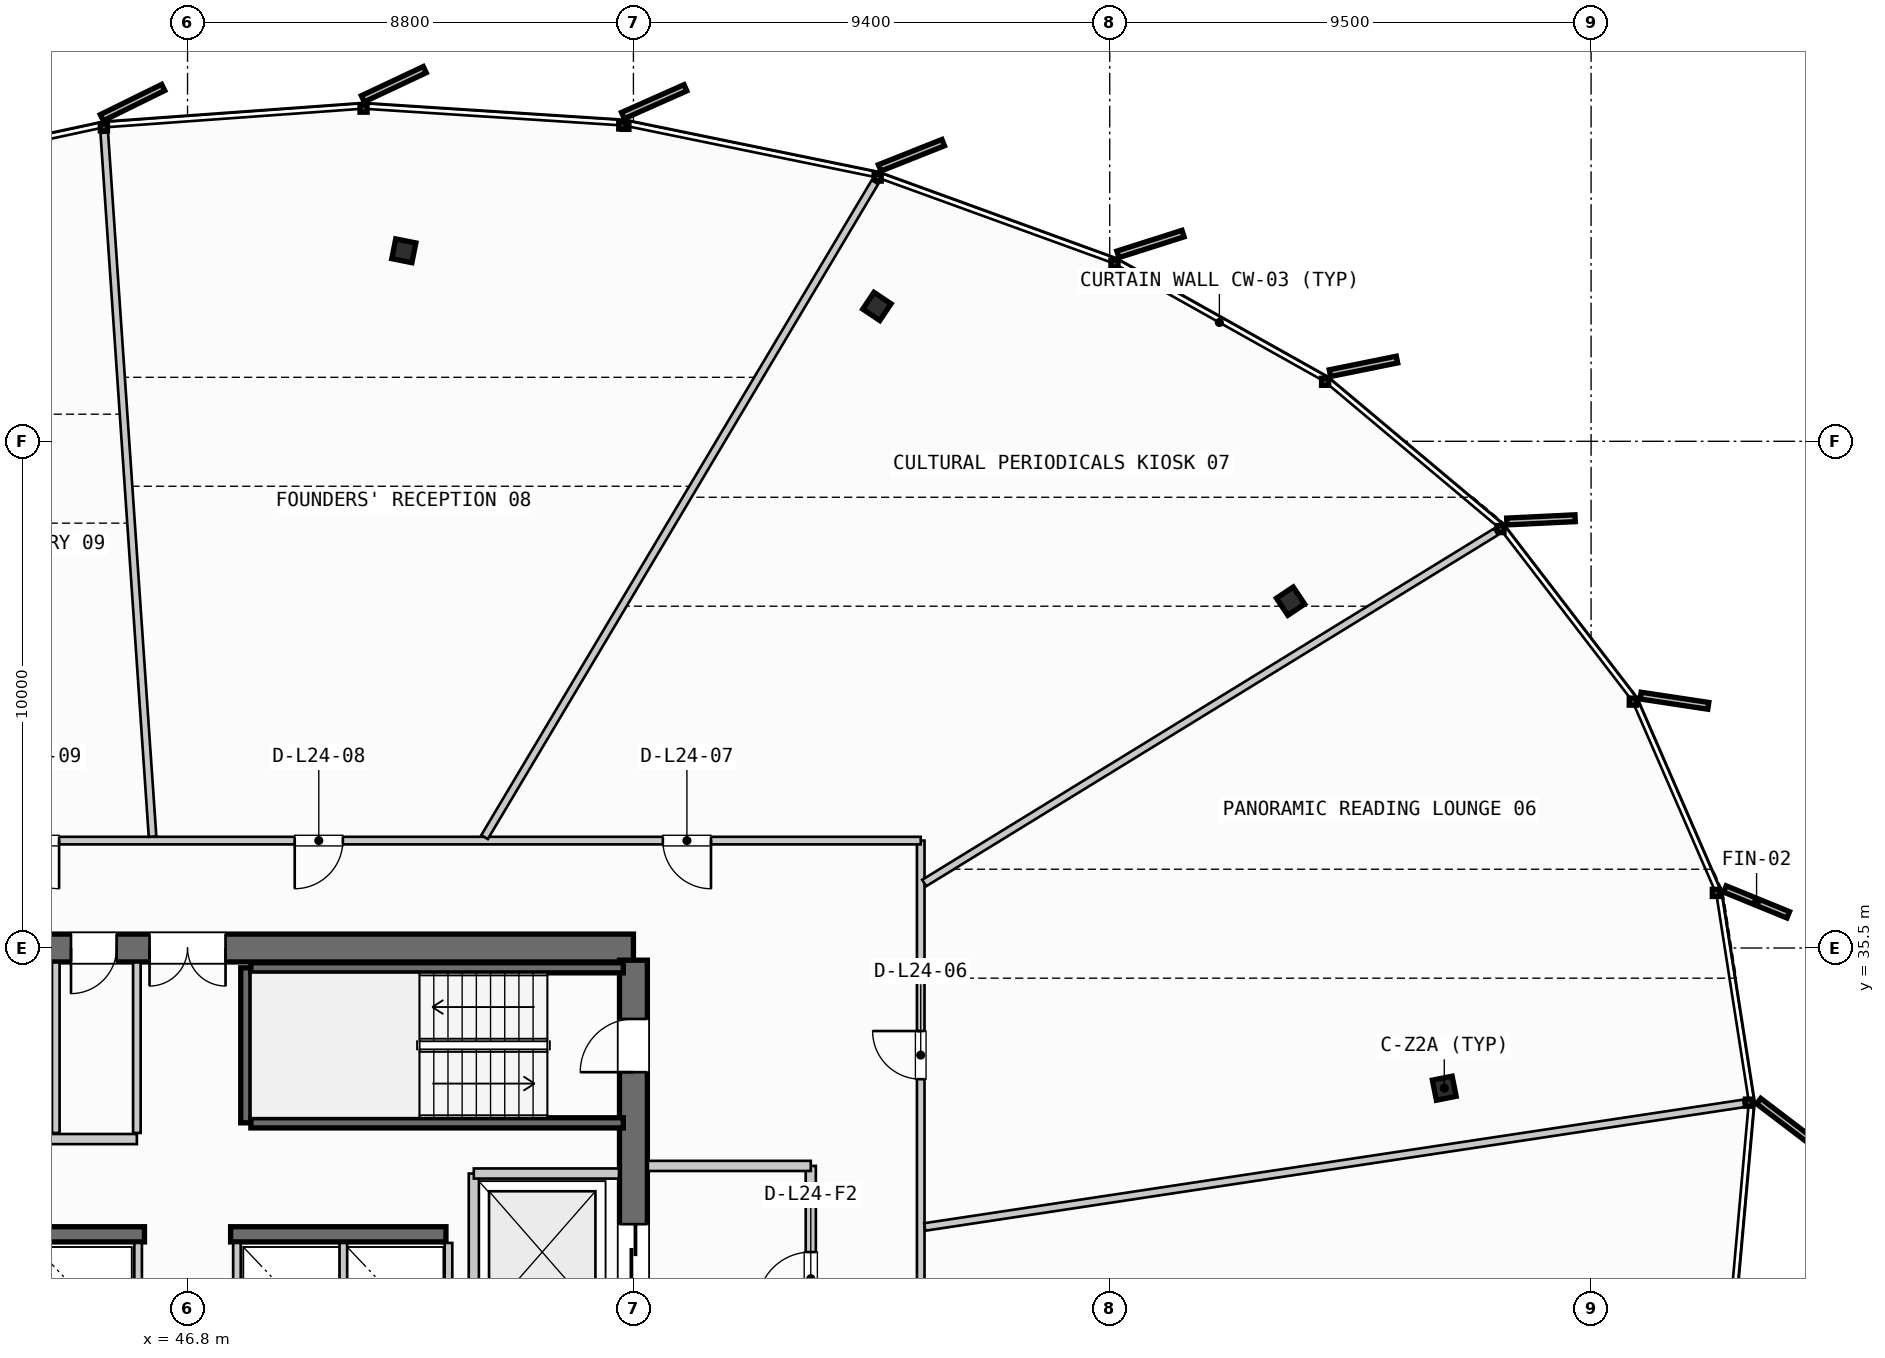
"""IFC4 building model, lengths in metres.
Left out: names, types, materials, properties, quantities, classifications, styles, units other than length and angle.
Written with IfcOpenShell. Run it as: python <this file> out.ifc"""

import sys

from ifc_helpers import new_model, si_unit, direction, frame, frame_2d, origin, origin_2d, place, context, subcontext, project, spatial, rectangle, i_section, extrude, source, transform, mapped, element, fill, save


model = new_model("IFC4")
c1 = context("Model", 3, precision=1e-05, world=origin(), true_north=direction((0.0, 1.0)))
c2 = subcontext(c1, "Body", "Model", "MODEL_VIEW")
j1 = project(units=[si_unit("LENGTHUNIT", "METRE"), si_unit("PLANEANGLEUNIT", "RADIAN")], contexts=[c1])
p1 = place(None, origin())
s1 = spatial("IfcSite", under=j1, at=p1, CompositionType="ELEMENT")
p2 = place(p1, origin())
s2 = spatial("IfcBuilding", under=s1, at=p2, CompositionType="ELEMENT")
p3 = place(p2, frame((0.0, 0.0, 100.0)))
s3 = spatial("IfcBuildingStorey", under=s2, at=p3, CompositionType="ELEMENT", Elevation=100.0)
p4 = place(p3, frame((55.6, 35.5, 0.0), z_axis=(0.0, 0.0, 1.0), x_axis=(-1.0, 0.0, 0.0)))
e1 = element("IfcWall", 1, at=p4, inside=s3, PredefinedType="SHEAR", context=c2, shape_type="SweptSolid", body=[
    extrude(rectangle(XDim=17.6, YDim=0.55, at=frame_2d((8.8, 0.0))), origin(), (0.0, 0.0, 1.0), 3.35),
])
p5 = place(p4, frame((8.05, 0.0, 0.0)))
e2 = element("IfcOpeningElement", 2, at=p5, cuts=e1, PredefinedType="OPENING", context=c2, shape_type="SweptSolid", body=[
    extrude(rectangle(XDim=1.5, YDim=2.2, at=frame_2d((0.75, 1.1))), frame((0.0, 0.285, 0.0), z_axis=(0.0, -1.0, 0.0), x_axis=(1.0, 0.0, 0.0)), (0.0, 0.0, 1.0), 0.57),
])
p6 = place(p4, frame((14.95, 0.0, 0.0)))
e3 = element("IfcOpeningElement", 3, at=p6, cuts=e1, PredefinedType="OPENING", context=c2, shape_type="SweptSolid", body=[
    extrude(rectangle(XDim=1.4, YDim=2.3, at=frame_2d((0.7, 1.15))), frame((0.0, 0.285, 0.0), z_axis=(0.0, -1.0, 0.0), x_axis=(1.0, 0.0, 0.0)), (0.0, 0.0, 1.0), 0.57),
])
p7 = place(p4, frame((12.3, 0.0, 0.0)))
e4 = element("IfcOpeningElement", 4, at=p7, cuts=e1, PredefinedType="OPENING", context=c2, shape_type="SweptSolid", body=[
    extrude(rectangle(XDim=0.95, YDim=2.15, at=frame_2d((0.475, 1.075))), frame((0.0, 0.285, 0.0), z_axis=(0.0, -1.0, 0.0), x_axis=(1.0, 0.0, 0.0)), (0.0, 0.0, 1.0), 0.57),
])
p8 = place(p4, frame((10.2, 0.0, 0.0)))
e5 = element("IfcOpeningElement", 5, at=p8, cuts=e1, PredefinedType="OPENING", context=c2, shape_type="SweptSolid", body=[
    extrude(rectangle(XDim=0.9, YDim=2.15, at=frame_2d((0.45, 1.075))), frame((0.0, 0.285, 0.0), z_axis=(0.0, -1.0, 0.0), x_axis=(1.0, 0.0, 0.0)), (0.0, 0.0, 1.0), 0.57),
])
p9 = place(p3, frame((55.6, 20.34, 0.0), z_axis=(0.0, 0.0, 1.0), x_axis=(0.0, 1.0, 0.0)))
e6 = element("IfcWall", 6, at=p9, inside=s3, PredefinedType="SHEAR", context=c2, shape_type="SweptSolid", body=[
    extrude(rectangle(XDim=14.92, YDim=0.55, at=frame_2d((7.46, 0.0))), origin(), (0.0, 0.0, 1.0), 3.35),
])
p10 = place(p9, frame((12.71, 0.0, 0.0)))
e7 = element("IfcOpeningElement", 7, at=p10, cuts=e6, PredefinedType="OPENING", context=c2, shape_type="SweptSolid", body=[
    extrude(rectangle(XDim=1.05, YDim=2.15, at=frame_2d((0.525, 1.075))), frame((0.0, 0.285, 0.0), z_axis=(0.0, -1.0, 0.0), x_axis=(1.0, 0.0, 0.0)), (0.0, 0.0, 1.0), 0.57),
])
p11 = place(p9, frame((8.61, 0.0, 0.0)))
e8 = element("IfcOpeningElement", 8, at=p11, cuts=e6, PredefinedType="OPENING", context=c2, shape_type="SweptSolid", body=[
    extrude(rectangle(XDim=1.1, YDim=2.2, at=frame_2d((0.55, 1.1))), frame((0.0, 0.285, 0.0), z_axis=(0.0, -1.0, 0.0), x_axis=(1.0, 0.0, 0.0)), (0.0, 0.0, 1.0), 0.57),
])
for number, where, z_axis, x_axis in (
    (9, (41.7, 29.85, 0.0), (0.0, 0.0, 1.0), (1.0, 0.0, 0.0)),
    (10, (47.65, 29.85, 0.0), (0.0, 0.0, 1.0), (1.0, 0.0, 0.0)),
):
    element("IfcWall", number, at=place(p3, frame(where, z_axis=z_axis, x_axis=x_axis)), inside=s3, PredefinedType="SHEAR", context=c2, shape_type="SweptSolid", body=[
        extrude(rectangle(XDim=4.25, YDim=0.3, at=frame_2d((2.125, 0.0))), origin(), (0.0, 0.0, 1.0), 3.35),
    ])
m1 = source(origin(), c2, "Body", "SweptSolid", [
    extrude(i_section(OverallWidth=0.405, OverallDepth=0.398, WebThickness=0.035, FlangeThickness=0.056, FilletRadius=0.015, at=origin_2d()), origin(), (0.0, 0.0, 1.0), 3.35),
])
for number, where, z_axis, x_axis in (
    (11, (71.603, 32.733, 0.0), (0.0, 0.0, 1.0), (0.981, 0.195, 0.0)),
    (12, (68.569, 42.345, 0.0), (0.0, 0.0, 1.0), (0.831, 0.556, 0.0)),
    (13, (60.405, 48.161, 0.0), (0.0, 0.0, 1.0), (0.556, 0.831, 0.0)),
    (14, (51.069, 49.259, 0.0), (0.0, 0.0, 1.0), (0.195, 0.981, 0.0)),
):
    element("IfcColumn", number, at=place(p3, frame(where, z_axis=z_axis, x_axis=x_axis)), inside=s3, PredefinedType="COLUMN", context=c2, shape_type="MappedRepresentation", body=[
        mapped(m1, transform((0.0, 0.0, 0.0), scale=1.0)),
    ])
p12 = place(p3, frame((47.95, 32.05, 0.0), z_axis=(0.0, 0.0, 1.0), x_axis=(0.0, 1.0, 0.0)))
e15 = element("IfcWall", 15, at=p12, inside=s3, PredefinedType="SHEAR", context=c2, shape_type="SweptSolid", body=[
    extrude(rectangle(XDim=3.06, YDim=0.2, at=frame_2d((1.53, 0.0))), origin(), (0.0, 0.0, 1.0), 3.35),
])
for number, where, z_axis, x_axis in (
    (16, (48.05, 35.11, 0.0), (0.0, 0.0, 1.0), (1.0, 0.0, 0.0)),
    (17, (55.4, 32.05, 0.0), (0.0, 0.0, 1.0), (-1.0, 0.0, 0.0)),
):
    element("IfcWall", number, at=place(p3, frame(where, z_axis=z_axis, x_axis=x_axis)), inside=s3, PredefinedType="SHEAR", context=c2, shape_type="SweptSolid", body=[
        extrude(rectangle(XDim=7.35, YDim=0.2, at=frame_2d((3.675, 0.0))), origin(), (0.0, 0.0, 1.0), 3.35),
    ])
p13 = place(p3, frame((52.45, 27.95, 0.0), z_axis=(0.0, 0.0, 1.0), x_axis=(0.0, 1.0, 0.0)))
e18 = element("IfcWall", 18, at=p13, inside=s3, PredefinedType="PARTITIONING", context=c2, shape_type="SweptSolid", body=[
    extrude(rectangle(XDim=3.1, YDim=0.2, at=frame_2d((1.55, 0.0))), origin(), (0.0, 0.0, 1.0), 2.28),
])
p14 = place(p3, frame((52.45, 31.05, 0.0), z_axis=(0.0, 0.0, 1.0), x_axis=(1.0, 0.0, 0.0)))
e19 = element("IfcWall", 19, at=p14, inside=s3, PredefinedType="PARTITIONING", context=c2, shape_type="SweptSolid", body=[
    extrude(rectangle(XDim=2.865, YDim=0.2, at=frame_2d((1.433, 0.0))), origin(), (0.0, 0.0, 1.0), 2.28),
])
p15 = place(p3, frame((59.1, 26.8, 0.0), z_axis=(0.0, 0.0, 1.0), x_axis=(0.0, 1.0, 0.0)))
e20 = element("IfcWall", 20, at=p15, inside=s3, PredefinedType="PARTITIONING", context=c2, shape_type="SweptSolid", body=[
    extrude(rectangle(XDim=4.4, YDim=0.2, at=frame_2d((2.2, 0.0))), origin(), (0.0, 0.0, 1.0), 2.28),
])
p16 = place(p15, frame((1.65, 0.0, 0.0)))
e21 = element("IfcOpeningElement", 21, at=p16, cuts=e20, PredefinedType="OPENING", context=c2, shape_type="SweptSolid", body=[
    extrude(rectangle(XDim=1.05, YDim=2.15, at=frame_2d((0.525, 1.075))), frame((0.0, 0.11, 0.0), z_axis=(0.0, -1.0, 0.0), x_axis=(1.0, 0.0, 0.0)), (0.0, 0.0, 1.0), 0.22),
])
p17 = place(p3, frame((55.885, 31.2, 0.0), z_axis=(0.0, 0.0, 1.0), x_axis=(1.0, 0.0, 0.0)))
e22 = element("IfcWall", 22, at=p17, inside=s3, PredefinedType="PARTITIONING", context=c2, shape_type="SweptSolid", body=[
    extrude(rectangle(XDim=3.215, YDim=0.2, at=frame_2d((1.607, 0.0))), origin(), (0.0, 0.0, 1.0), 2.28),
])
for number, where, z_axis, x_axis in (
    (23, (45.825, 27.41, 0.0), (0.0, 0.0, 1.0), (0.0, 1.0, 0.0)),
    (24, (47.775, 27.41, 0.0), (0.0, 0.0, 1.0), (0.0, 1.0, 0.0)),
    (25, (49.875, 27.41, 0.0), (0.0, 0.0, 1.0), (0.0, 1.0, 0.0)),
    (26, (51.95, 27.41, 0.0), (0.0, 0.0, 1.0), (0.0, 1.0, 0.0)),
):
    element("IfcWall", number, at=place(p3, frame(where, z_axis=z_axis, x_axis=x_axis)), inside=s3, PredefinedType="PARTITIONING", context=c2, shape_type="SweptSolid", body=[
        extrude(rectangle(XDim=2.27, YDim=0.15, at=frame_2d((1.135, 0.0))), origin(), (0.0, 0.0, 1.0), 2.28),
    ])
p18 = place(p3, frame((38.285, 31.73, 0.0), z_axis=(0.0, 0.0, 1.0), x_axis=(1.0, 0.0, 0.0)))
e27 = element("IfcWall", 27, at=p18, inside=s3, PredefinedType="PARTITIONING", context=c2, shape_type="SweptSolid", body=[
    extrude(rectangle(XDim=7.515, YDim=0.2, at=frame_2d((3.758, 0.0))), origin(), (0.0, 0.0, 1.0), 2.28),
])
p19 = place(p3, frame((45.8, 31.85, 0.0), z_axis=(0.0, 0.0, 1.0), x_axis=(0.0, 1.0, 0.0)))
e28 = element("IfcWall", 28, at=p19, inside=s3, PredefinedType="PARTITIONING", context=c2, shape_type="SweptSolid", body=[
    extrude(rectangle(XDim=3.365, YDim=0.15, at=frame_2d((1.683, 0.0))), origin(), (0.0, 0.0, 1.0), 2.28),
])
p20 = place(p3, frame((44.2, 31.85, 0.0), z_axis=(0.0, 0.0, 1.0), x_axis=(0.0, 1.0, 0.0)))
e29 = element("IfcWall", 29, at=p20, inside=s3, PredefinedType="PLUMBINGWALL", context=c2, shape_type="SweptSolid", body=[
    extrude(rectangle(XDim=3.365, YDim=0.15, at=frame_2d((1.683, 0.0))), origin(), (0.0, 0.0, 1.0), 2.28),
])
p21 = place(p3, frame((61.27, 17.14, 0.0), z_axis=(0.0, 0.0, 1.0), x_axis=(0.0, 1.0, 0.0)))
e30 = element("IfcWall", 30, at=p21, inside=s3, PredefinedType="PARTITIONING", context=c2, shape_type="SweptSolid", body=[
    extrude(rectangle(XDim=20.48, YDim=0.15, at=frame_2d((10.24, 0.0))), origin(), (0.0, 0.0, 1.0), 2.28),
])
p22 = place(p21, frame((2.947, 0.0, 0.0)))
e31 = element("IfcOpeningElement", 31, at=p22, cuts=e30, PredefinedType="OPENING", context=c2, shape_type="SweptSolid", body=[
    extrude(rectangle(XDim=0.95, YDim=2.15, at=frame_2d((0.475, 1.075))), frame((0.0, 0.085, 0.0), z_axis=(0.0, -1.0, 0.0), x_axis=(1.0, 0.0, 0.0)), (0.0, 0.0, 1.0), 0.17),
])
p23 = place(p21, frame((9.074, 0.0, 0.0)))
e32 = element("IfcOpeningElement", 32, at=p23, cuts=e30, PredefinedType="OPENING", context=c2, shape_type="SweptSolid", body=[
    extrude(rectangle(XDim=0.95, YDim=2.15, at=frame_2d((0.475, 1.075))), frame((0.0, 0.085, 0.0), z_axis=(0.0, -1.0, 0.0), x_axis=(1.0, 0.0, 0.0)), (0.0, 0.0, 1.0), 0.17),
])
p24 = place(p21, frame((15.772, 0.0, 0.0)))
e33 = element("IfcOpeningElement", 33, at=p24, cuts=e30, PredefinedType="OPENING", context=c2, shape_type="SweptSolid", body=[
    extrude(rectangle(XDim=0.95, YDim=2.15, at=frame_2d((0.475, 1.075))), frame((0.0, 0.085, 0.0), z_axis=(0.0, -1.0, 0.0), x_axis=(1.0, 0.0, 0.0)), (0.0, 0.0, 1.0), 0.17),
])
p25 = place(p3, frame((61.27, 37.62, 0.0), z_axis=(0.0, 0.0, 1.0), x_axis=(-1.0, 0.0, 0.0)))
e34 = element("IfcWall", 34, at=p25, inside=s3, PredefinedType="PARTITIONING", context=c2, shape_type="SweptSolid", body=[
    extrude(rectangle(XDim=28.42, YDim=0.15, at=frame_2d((14.21, 0.0))), origin(), (0.0, 0.0, 1.0), 2.28),
])
p26 = place(p25, frame((4.139, 0.0, 0.0)))
e35 = element("IfcOpeningElement", 35, at=p26, cuts=e34, PredefinedType="OPENING", context=c2, shape_type="SweptSolid", body=[
    extrude(rectangle(XDim=0.95, YDim=2.15, at=frame_2d((0.475, 1.075))), frame((0.0, 0.085, 0.0), z_axis=(0.0, -1.0, 0.0), x_axis=(1.0, 0.0, 0.0)), (0.0, 0.0, 1.0), 0.17),
])
p27 = place(p25, frame((11.405, 0.0, 0.0)))
e36 = element("IfcOpeningElement", 36, at=p27, cuts=e34, PredefinedType="OPENING", context=c2, shape_type="SweptSolid", body=[
    extrude(rectangle(XDim=0.95, YDim=2.15, at=frame_2d((0.475, 1.075))), frame((0.0, 0.085, 0.0), z_axis=(0.0, -1.0, 0.0), x_axis=(1.0, 0.0, 0.0)), (0.0, 0.0, 1.0), 0.17),
])
p28 = place(p25, frame((17.005, 0.0, 0.0)))
e37 = element("IfcOpeningElement", 37, at=p28, cuts=e34, PredefinedType="OPENING", context=c2, shape_type="SweptSolid", body=[
    extrude(rectangle(XDim=0.95, YDim=2.15, at=frame_2d((0.475, 1.075))), frame((0.0, 0.085, 0.0), z_axis=(0.0, -1.0, 0.0), x_axis=(1.0, 0.0, 0.0)), (0.0, 0.0, 1.0), 0.17),
])
p29 = place(p25, frame((23.328, 0.0, 0.0)))
e38 = element("IfcOpeningElement", 38, at=p29, cuts=e34, PredefinedType="OPENING", context=c2, shape_type="SweptSolid", body=[
    extrude(rectangle(XDim=0.95, YDim=2.15, at=frame_2d((0.475, 1.075))), frame((0.0, 0.085, 0.0), z_axis=(0.0, -1.0, 0.0), x_axis=(1.0, 0.0, 0.0)), (0.0, 0.0, 1.0), 0.17),
])
p30 = place(p3, frame((61.349, 29.995, 0.0), z_axis=(0.0, 0.0, 1.0), x_axis=(0.988811435939, 0.149170855587, 0.0)))
e39 = element("IfcWall", 39, at=p30, inside=s3, PredefinedType="PARTITIONING", context=c2, shape_type="SweptSolid", body=[
    extrude(rectangle(XDim=16.345, YDim=0.15, at=frame_2d((8.173, 0.0))), origin(), (0.0, 0.0, 1.0), 2.28),
])
p31 = place(p3, frame((61.338, 36.783, 0.0), z_axis=(0.0, 0.0, 1.0), x_axis=(0.852112517171, 0.523358632374, 0.0)))
e40 = element("IfcWall", 40, at=p31, inside=s3, PredefinedType="PARTITIONING", context=c2, shape_type="SweptSolid", body=[
    extrude(rectangle(XDim=13.242, YDim=0.15, at=frame_2d((6.621, 0.0))), origin(), (0.0, 0.0, 1.0), 2.28),
])
p32 = place(p3, frame((52.662, 37.689, 0.0), z_axis=(0.0, 0.0, 1.0), x_axis=(0.512009752846, 0.858979634794, 0.0)))
e41 = element("IfcWall", 41, at=p32, inside=s3, PredefinedType="PARTITIONING", context=c2, shape_type="SweptSolid", body=[
    extrude(rectangle(XDim=15.047, YDim=0.15, at=frame_2d((7.524, 0.0))), origin(), (0.0, 0.0, 1.0), 2.28),
])
p33 = place(p3, frame((46.109, 37.7, 0.0), z_axis=(0.0, 0.0, 1.0), x_axis=(-0.068438008165, 0.997655370876, 0.0)))
e42 = element("IfcWall", 42, at=p33, inside=s3, PredefinedType="PARTITIONING", context=c2, shape_type="SweptSolid", body=[
    extrude(rectangle(XDim=13.923, YDim=0.15, at=frame_2d((6.962, 0.0))), origin(), (0.0, 0.0, 1.0), 2.28),
])
m2 = source(origin(), c2, "Body", "SweptSolid", [
    extrude(rectangle(XDim=1.05, YDim=2.15, at=frame_2d((0.525, 1.075))), frame((0.0, 0.025, 0.0), z_axis=(0.0, -1.0, 0.0), x_axis=(1.0, 0.0, 0.0)), (0.0, 0.0, 1.0), 0.05),
])
p34 = place(p10, origin())
e43 = element("IfcDoor", 43, at=p34, inside=s3, OperationType="SINGLE_SWING_LEFT", PredefinedType="DOOR", context=c2, shape_type="MappedRepresentation", body=[
    mapped(m2, transform((0.0, 0.0, 0.0), scale=1.0)),
])
fill(e7, e43)
m3 = source(origin(), c2, "Body", "SweptSolid", [
    extrude(rectangle(XDim=1.5, YDim=2.2, at=frame_2d((0.75, 1.1))), frame((0.0, 0.025, 0.0), z_axis=(0.0, -1.0, 0.0), x_axis=(1.0, 0.0, 0.0)), (0.0, 0.0, 1.0), 0.05),
])
p35 = place(p5, origin())
e44 = element("IfcDoor", 44, at=p35, inside=s3, OperationType="DOUBLE_DOOR_SINGLE_SWING", PredefinedType="DOOR", context=c2, shape_type="MappedRepresentation", body=[
    mapped(m3, transform((0.0, 0.0, 0.0), scale=1.0)),
])
fill(e2, e44)
m4 = source(origin(), c2, "Body", "SweptSolid", [
    extrude(rectangle(XDim=1.1, YDim=2.2, at=frame_2d((0.55, 1.1))), frame((0.0, 0.025, 0.0), z_axis=(0.0, -1.0, 0.0), x_axis=(1.0, 0.0, 0.0)), (0.0, 0.0, 1.0), 0.05),
])
p36 = place(p11, origin())
e45 = element("IfcDoor", 45, at=p36, inside=s3, OperationType="SLIDING_TO_RIGHT", PredefinedType="DOOR", context=c2, shape_type="MappedRepresentation", body=[
    mapped(m4, transform((0.0, 0.0, 0.0), scale=1.0)),
])
fill(e8, e45)
m5 = source(origin(), c2, "Body", "SweptSolid", [
    extrude(rectangle(XDim=0.9, YDim=2.15, at=frame_2d((0.45, 1.075))), frame((0.0, 0.025, 0.0), z_axis=(0.0, -1.0, 0.0), x_axis=(1.0, 0.0, 0.0)), (0.0, 0.0, 1.0), 0.05),
])
p37 = place(p8, origin())
e46 = element("IfcDoor", 46, at=p37, inside=s3, OperationType="SINGLE_SWING_RIGHT", PredefinedType="DOOR", context=c2, shape_type="MappedRepresentation", body=[
    mapped(m5, transform((0.0, 0.0, 0.0), scale=1.0)),
])
fill(e5, e46)
p38 = place(p16, origin())
e47 = element("IfcDoor", 47, at=p38, inside=s3, OperationType="SINGLE_SWING_LEFT", PredefinedType="DOOR", context=c2, shape_type="MappedRepresentation", body=[
    mapped(m2, transform((0.0, 0.0, 0.0), scale=1.0)),
])
fill(e21, e47)
m6 = source(origin(), c2, "Body", "SweptSolid", [
    extrude(rectangle(XDim=0.95, YDim=2.15, at=frame_2d((0.475, 1.075))), frame((0.0, 0.025, 0.0), z_axis=(0.0, -1.0, 0.0), x_axis=(1.0, 0.0, 0.0)), (0.0, 0.0, 1.0), 0.05),
])
p39 = place(p24, origin())
e48 = element("IfcDoor", 48, at=p39, inside=s3, OperationType="SINGLE_SWING_RIGHT", PredefinedType="DOOR", context=c2, shape_type="MappedRepresentation", body=[
    mapped(m6, transform((0.0, 0.0, 0.0), scale=1.0)),
])
fill(e33, e48)
p40 = place(p26, origin())
e49 = element("IfcDoor", 49, at=p40, inside=s3, OperationType="SINGLE_SWING_LEFT", PredefinedType="DOOR", context=c2, shape_type="MappedRepresentation", body=[
    mapped(m6, transform((0.0, 0.0, 0.0), scale=1.0)),
])
fill(e35, e49)
p41 = place(p27, origin())
e50 = element("IfcDoor", 50, at=p41, inside=s3, OperationType="SINGLE_SWING_RIGHT", PredefinedType="DOOR", context=c2, shape_type="MappedRepresentation", body=[
    mapped(m6, transform((0.0, 0.0, 0.0), scale=1.0)),
])
fill(e36, e50)
p42 = place(p28, origin())
e51 = element("IfcDoor", 51, at=p42, inside=s3, OperationType="SINGLE_SWING_LEFT", PredefinedType="DOOR", context=c2, shape_type="MappedRepresentation", body=[
    mapped(m6, transform((0.0, 0.0, 0.0), scale=1.0)),
])
fill(e37, e51)
save(model, sys.argv[1])
